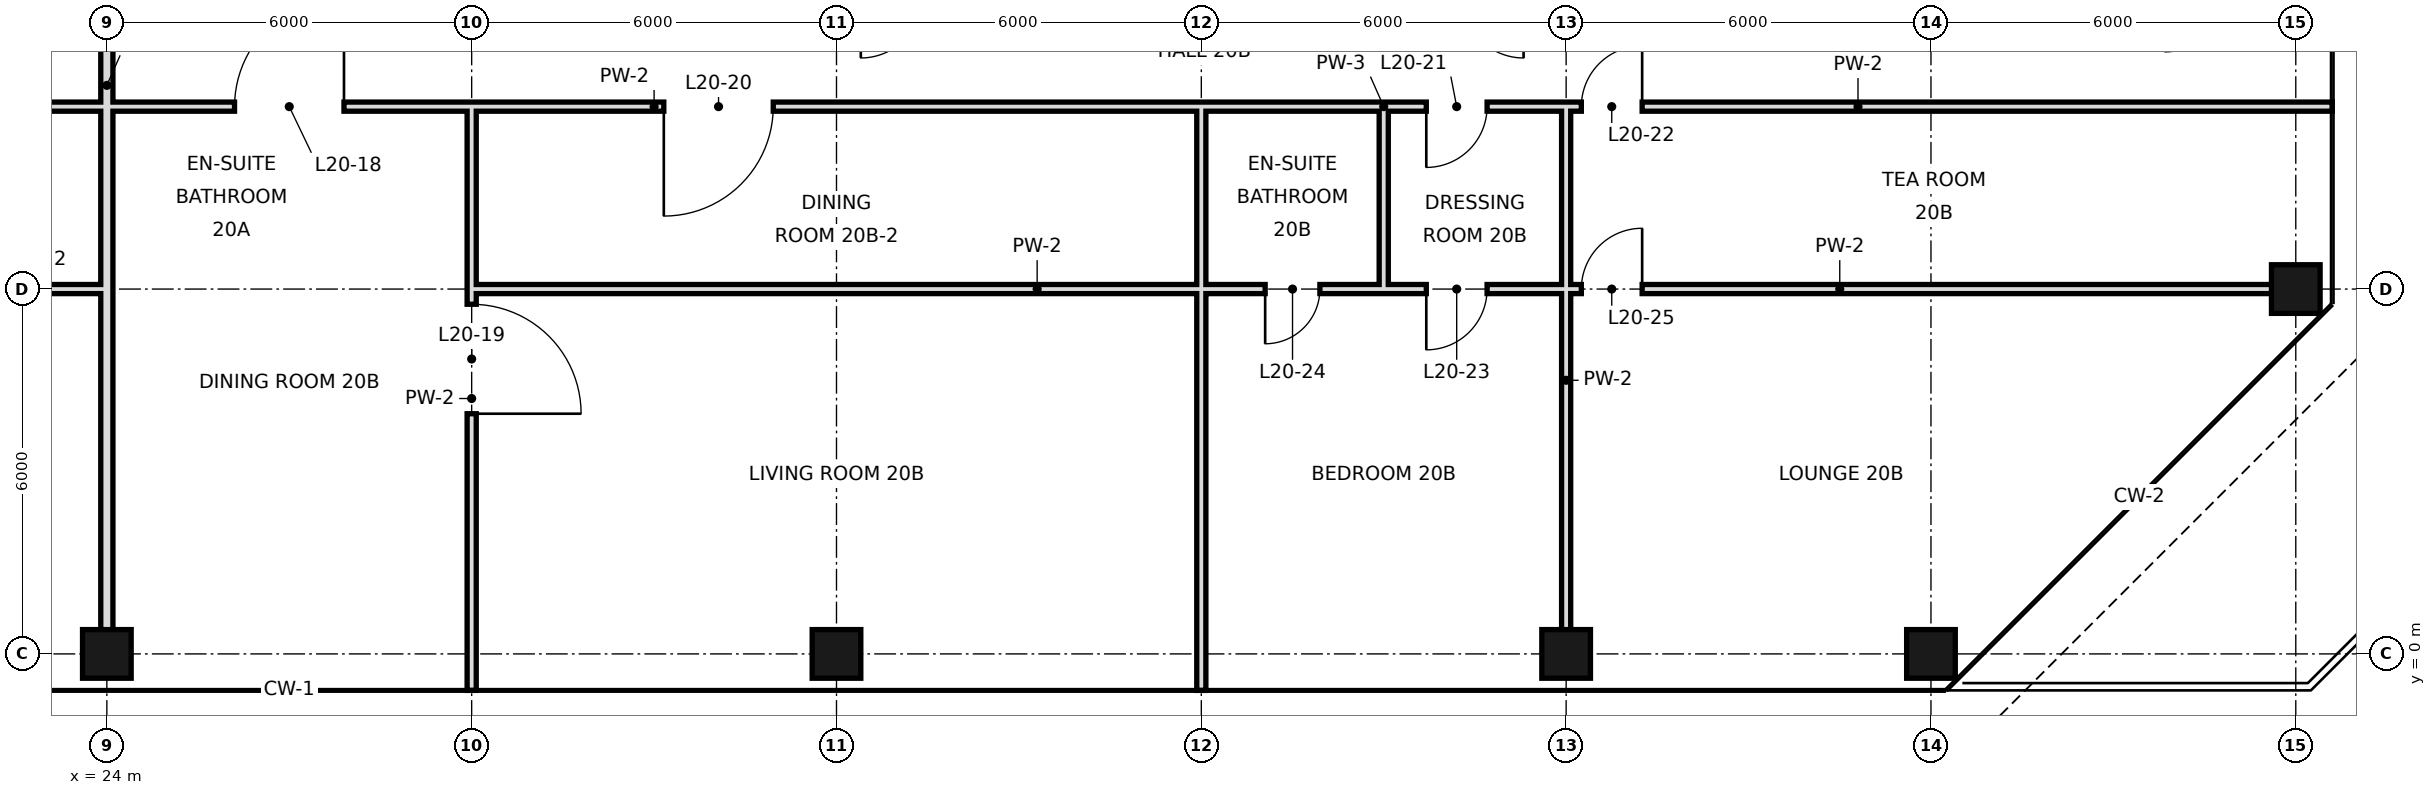
"""IFC4 building model, lengths in metres.
Left out: names, types, materials, properties, quantities, classifications, styles, units other than length and angle.
Written with IfcOpenShell. Run it as: python <this file> out.ifc"""

import sys

from ifc_helpers import new_model, si_unit, direction, frame, frame_2d, origin, origin_2d, place, context, subcontext, project, spatial, rectangle, hollow_rectangle, extrude, element, fill, save


model = new_model("IFC4")
c1 = context("Model", 3, precision=1e-05, world=origin(), true_north=direction((0.0, 1.0)))
c2 = subcontext(c1, "Body", "Model", "MODEL_VIEW")
j1 = project(units=[si_unit("LENGTHUNIT", "METRE"), si_unit("PLANEANGLEUNIT", "RADIAN")], contexts=[c1])
p1 = place(None, origin())
s1 = spatial("IfcSite", under=j1, at=p1, CompositionType="ELEMENT")
p2 = place(p1, origin())
s2 = spatial("IfcBuilding", under=s1, at=p2, CompositionType="ELEMENT")
p3 = place(p2, frame((0.0, 0.0, 96.2)))
s3 = spatial("IfcBuildingStorey", under=s2, at=p3, CompositionType="ELEMENT", Elevation=96.2)
for number, where, z_axis, x_axis in (
    (1, (24.0, 0.0, 0.0), (0.0, 0.0, 1.0), (1.0, 0.0, 0.0)),
    (2, (36.0, 0.0, 0.0), (0.0, 0.0, 1.0), (1.0, 0.0, 0.0)),
    (3, (48.0, 0.0, 0.0), (0.0, 0.0, 1.0), (1.0, 0.0, 0.0)),
):
    element("IfcColumn", number, at=place(p3, frame(where, z_axis=z_axis, x_axis=x_axis)), inside=s3, PredefinedType="COLUMN", context=c2, shape_type="SweptSolid", body=[
        extrude(hollow_rectangle(XDim=0.8, YDim=0.8, WallThickness=0.04, at=origin_2d()), origin(), (0.0, 0.0, 1.0), 3.6),
    ])
for number, where, z_axis, x_axis in (
    (4, (54.0, 0.0, -0.3), (0.0, 0.0, 1.0), (1.0, 0.0, 0.0)),
    (5, (60.0, 6.0, -0.3), (0.0, 0.0, 1.0), (1.0, 0.0, 0.0)),
):
    element("IfcColumn", number, at=place(p3, frame(where, z_axis=z_axis, x_axis=x_axis)), inside=s3, PredefinedType="COLUMN", context=c2, shape_type="SweptSolid", body=[
        extrude(hollow_rectangle(XDim=0.8, YDim=0.8, WallThickness=0.04, at=origin_2d()), origin(), (0.0, 0.0, 1.0), 3.9),
    ])
p4 = place(p3, frame((24.0, 0.0, 0.0), z_axis=(0.0, 0.0, 1.0), x_axis=(0.0, 1.0, 0.0)))
e6 = element("IfcWall", 6, at=p4, inside=s3, PredefinedType="SOLIDWALL", context=c2, shape_type="SweptSolid", body=[
    extrude(rectangle(XDim=18.7, YDim=0.2, at=frame_2d((9.35, 0.0))), origin(), (0.0, 0.0, 1.0), 2.72),
])
p5 = place(p3, frame((30.0, -0.6, 0.0), z_axis=(0.0, 0.0, 1.0), x_axis=(0.0, 1.0, 0.0)))
e7 = element("IfcWall", 7, at=p5, inside=s3, PredefinedType="PARTITIONING", context=c2, shape_type="SweptSolid", body=[
    extrude(rectangle(XDim=9.6, YDim=0.15, at=frame_2d((4.8, 0.0))), origin(), (0.0, 0.0, 1.0), 2.72),
])
p6 = place(p5, frame((4.55, 0.0, 0.0)))
e8 = element("IfcOpeningElement", 8, at=p6, cuts=e7, PredefinedType="OPENING", context=c2, shape_type="SweptSolid", body=[
    extrude(rectangle(XDim=1.8, YDim=2.4, at=frame_2d((0.9, 1.2))), frame((0.0, 0.085, 0.0), z_axis=(0.0, -1.0, 0.0), x_axis=(1.0, 0.0, 0.0)), (0.0, 0.0, 1.0), 0.17),
])
p7 = place(p3, frame((42.0, -0.6, 0.0), z_axis=(0.0, 0.0, 1.0), x_axis=(0.0, 1.0, 0.0)))
e9 = element("IfcWall", 9, at=p7, inside=s3, PredefinedType="PARTITIONING", context=c2, shape_type="SweptSolid", body=[
    extrude(rectangle(XDim=6.6, YDim=0.15, at=frame_2d((3.3, 0.0))), origin(), (0.0, 0.0, 1.0), 2.72),
])
p8 = place(p3, frame((42.0, 6.0, 0.0), z_axis=(0.0, 0.0, 1.0), x_axis=(0.0, 1.0, 0.0)))
e10 = element("IfcWall", 10, at=p8, inside=s3, PredefinedType="PARTITIONING", context=c2, shape_type="SweptSolid", body=[
    extrude(rectangle(XDim=3.0, YDim=0.15, at=frame_2d((1.5, 0.0))), origin(), (0.0, 0.0, 1.0), 2.72),
])
p9 = place(p3, frame((45.0, 6.0, 0.0), z_axis=(0.0, 0.0, 1.0), x_axis=(0.0, 1.0, 0.0)))
e11 = element("IfcWall", 11, at=p9, inside=s3, PredefinedType="PARTITIONING", context=c2, shape_type="SweptSolid", body=[
    extrude(rectangle(XDim=3.0, YDim=0.15, at=frame_2d((1.5, 0.0))), origin(), (0.0, 0.0, 1.0), 3.42),
])
p10 = place(p3, frame((48.0, 0.0, 0.0), z_axis=(0.0, 0.0, 1.0), x_axis=(0.0, 1.0, 0.0)))
e12 = element("IfcWall", 12, at=p10, inside=s3, PredefinedType="PARTITIONING", context=c2, shape_type="SweptSolid", body=[
    extrude(rectangle(XDim=9.0, YDim=0.15, at=frame_2d((4.5, 0.0))), origin(), (0.0, 0.0, 1.0), 2.72),
])
p11 = place(p3, frame((30.0, 6.0, 0.0), z_axis=(0.0, 0.0, 1.0), x_axis=(1.0, 0.0, 0.0)))
e13 = element("IfcWall", 13, at=p11, inside=s3, PredefinedType="PARTITIONING", context=c2, shape_type="SweptSolid", body=[
    extrude(rectangle(XDim=12.0, YDim=0.15, at=frame_2d((6.0, 0.0))), origin(), (0.0, 0.0, 1.0), 2.97),
])
p12 = place(p3, frame((45.0, 6.0, 0.0), z_axis=(0.0, 0.0, 1.0), x_axis=(1.0, 0.0, 0.0)))
e14 = element("IfcWall", 14, at=p12, inside=s3, PredefinedType="PARTITIONING", context=c2, shape_type="SweptSolid", body=[
    extrude(rectangle(XDim=15.0, YDim=0.15, at=frame_2d((7.5, 0.0))), origin(), (0.0, 0.0, 1.0), 2.72),
])
p13 = place(p12, frame((0.7, 0.0, 0.0)))
e15 = element("IfcOpeningElement", 15, at=p13, cuts=e14, PredefinedType="OPENING", context=c2, shape_type="SweptSolid", body=[
    extrude(rectangle(XDim=1.0, YDim=2.4, at=frame_2d((0.5, 1.2))), frame((0.0, 0.085, 0.0), z_axis=(0.0, -1.0, 0.0), x_axis=(1.0, 0.0, 0.0)), (0.0, 0.0, 1.0), 0.17),
])
p14 = place(p12, frame((3.25, 0.0, 0.0)))
e16 = element("IfcOpeningElement", 16, at=p14, cuts=e14, PredefinedType="OPENING", context=c2, shape_type="SweptSolid", body=[
    extrude(rectangle(XDim=1.0, YDim=2.4, at=frame_2d((0.5, 1.2))), frame((0.0, 0.085, 0.0), z_axis=(0.0, -1.0, 0.0), x_axis=(1.0, 0.0, 0.0)), (0.0, 0.0, 1.0), 0.17),
])
p15 = place(p3, frame((21.6, 6.0, 0.0), z_axis=(0.0, 0.0, 1.0), x_axis=(1.0, 0.0, 0.0)))
e17 = element("IfcWall", 17, at=p15, inside=s3, PredefinedType="PARTITIONING", context=c2, shape_type="SweptSolid", body=[
    extrude(rectangle(XDim=2.4, YDim=0.15, at=frame_2d((1.2, 0.0))), origin(), (0.0, 0.0, 1.0), 2.97),
])
p16 = place(p15, frame((0.25, 0.0, 0.0)))
e18 = element("IfcOpeningElement", 18, at=p16, cuts=e17, PredefinedType="OPENING", context=c2, shape_type="SweptSolid", body=[
    extrude(rectangle(XDim=0.9, YDim=2.4, at=frame_2d((0.45, 1.2))), frame((0.0, 0.085, 0.0), z_axis=(0.0, -1.0, 0.0), x_axis=(1.0, 0.0, 0.0)), (0.0, 0.0, 1.0), 0.17),
])
p17 = place(p3, frame((42.0, 6.0, 0.0), z_axis=(0.0, 0.0, 1.0), x_axis=(1.0, 0.0, 0.0)))
e19 = element("IfcWall", 19, at=p17, inside=s3, PredefinedType="PARTITIONING", context=c2, shape_type="SweptSolid", body=[
    extrude(rectangle(XDim=3.0, YDim=0.15, at=frame_2d((1.5, 0.0))), origin(), (0.0, 0.0, 1.0), 2.97),
])
p18 = place(p17, frame((1.05, 0.0, 0.0)))
e20 = element("IfcOpeningElement", 20, at=p18, cuts=e19, PredefinedType="OPENING", context=c2, shape_type="SweptSolid", body=[
    extrude(rectangle(XDim=0.9, YDim=2.4, at=frame_2d((0.45, 1.2))), frame((0.0, 0.085, 0.0), z_axis=(0.0, -1.0, 0.0), x_axis=(1.0, 0.0, 0.0)), (0.0, 0.0, 1.0), 0.17),
])
p19 = place(p3, frame((24.0, 9.0, 0.0), z_axis=(0.0, 0.0, 1.0), x_axis=(1.0, 0.0, 0.0)))
e21 = element("IfcWall", 21, at=p19, inside=s3, PredefinedType="PARTITIONING", context=c2, shape_type="SweptSolid", body=[
    extrude(rectangle(XDim=18.0, YDim=0.15, at=frame_2d((9.0, 0.0))), origin(), (0.0, 0.0, 1.0), 3.42),
])
p20 = place(p19, frame((2.1, 0.0, 0.0)))
e22 = element("IfcOpeningElement", 22, at=p20, cuts=e21, PredefinedType="OPENING", context=c2, shape_type="SweptSolid", body=[
    extrude(rectangle(XDim=1.8, YDim=2.4, at=frame_2d((0.9, 1.2))), frame((0.0, 0.085, 0.0), z_axis=(0.0, -1.0, 0.0), x_axis=(1.0, 0.0, 0.0)), (0.0, 0.0, 1.0), 0.17),
])
p21 = place(p19, frame((9.16, 0.0, 0.0)))
e23 = element("IfcOpeningElement", 23, at=p21, cuts=e21, PredefinedType="OPENING", context=c2, shape_type="SweptSolid", body=[
    extrude(rectangle(XDim=1.8, YDim=2.4, at=frame_2d((0.9, 1.2))), frame((0.0, 0.085, 0.0), z_axis=(0.0, -1.0, 0.0), x_axis=(1.0, 0.0, 0.0)), (0.0, 0.0, 1.0), 0.17),
])
p22 = place(p3, frame((45.0, 9.0, 0.0), z_axis=(0.0, 0.0, 1.0), x_axis=(1.0, 0.0, 0.0)))
e24 = element("IfcWall", 24, at=p22, inside=s3, PredefinedType="PARTITIONING", context=c2, shape_type="SweptSolid", body=[
    extrude(rectangle(XDim=15.6, YDim=0.15, at=frame_2d((7.8, 0.0))), origin(), (0.0, 0.0, 1.0), 3.42),
])
p23 = place(p22, frame((0.7, 0.0, 0.0)))
e25 = element("IfcOpeningElement", 25, at=p23, cuts=e24, PredefinedType="OPENING", context=c2, shape_type="SweptSolid", body=[
    extrude(rectangle(XDim=1.0, YDim=2.4, at=frame_2d((0.5, 1.2))), frame((0.0, 0.085, 0.0), z_axis=(0.0, -1.0, 0.0), x_axis=(1.0, 0.0, 0.0)), (0.0, 0.0, 1.0), 0.17),
])
p24 = place(p22, frame((3.25, 0.0, 0.0)))
e26 = element("IfcOpeningElement", 26, at=p24, cuts=e24, PredefinedType="OPENING", context=c2, shape_type="SweptSolid", body=[
    extrude(rectangle(XDim=1.0, YDim=2.4, at=frame_2d((0.5, 1.2))), frame((0.0, 0.085, 0.0), z_axis=(0.0, -1.0, 0.0), x_axis=(1.0, 0.0, 0.0)), (0.0, 0.0, 1.0), 0.17),
])
p25 = place(p3, frame((21.6, 9.0, 0.0), z_axis=(0.0, 0.0, 1.0), x_axis=(1.0, 0.0, 0.0)))
e27 = element("IfcWall", 27, at=p25, inside=s3, PredefinedType="PARTITIONING", context=c2, shape_type="SweptSolid", body=[
    extrude(rectangle(XDim=2.4, YDim=0.15, at=frame_2d((1.2, 0.0))), origin(), (0.0, 0.0, 1.0), 3.42),
])
p26 = place(p3, frame((42.0, 9.0, 0.0), z_axis=(0.0, 0.0, 1.0), x_axis=(1.0, 0.0, 0.0)))
e28 = element("IfcWall", 28, at=p26, inside=s3, PredefinedType="PARTITIONING", context=c2, shape_type="SweptSolid", body=[
    extrude(rectangle(XDim=3.0, YDim=0.15, at=frame_2d((1.5, 0.0))), origin(), (0.0, 0.0, 1.0), 3.42),
])
p27 = place(p20, frame((1.8, 0.0, 0.0), z_axis=(0.0, 0.0, 1.0), x_axis=(-1.0, 0.0, 0.0)))
e29 = element("IfcDoor", 29, at=p27, inside=s3, OperationType="SINGLE_SWING_LEFT", PredefinedType="DOOR", context=c2, shape_type="SweptSolid", body=[
    extrude(rectangle(XDim=1.8, YDim=2.4, at=frame_2d((0.9, 1.2))), frame((0.0, 0.025, 0.0), z_axis=(0.0, -1.0, 0.0), x_axis=(1.0, 0.0, 0.0)), (0.0, 0.0, 1.0), 0.05),
])
fill(e22, e29)
p28 = place(p6, frame((1.8, 0.0, 0.0), z_axis=(0.0, 0.0, 1.0), x_axis=(-1.0, 0.0, 0.0)))
e30 = element("IfcDoor", 30, at=p28, inside=s3, OperationType="SINGLE_SWING_RIGHT", PredefinedType="DOOR", context=c2, shape_type="SweptSolid", body=[
    extrude(rectangle(XDim=1.8, YDim=2.4, at=frame_2d((0.9, 1.2))), frame((0.0, 0.025, 0.0), z_axis=(0.0, -1.0, 0.0), x_axis=(1.0, 0.0, 0.0)), (0.0, 0.0, 1.0), 0.05),
])
fill(e8, e30)
p29 = place(p21, frame((1.8, 0.0, 0.0), z_axis=(0.0, 0.0, 1.0), x_axis=(-1.0, 0.0, 0.0)))
e31 = element("IfcDoor", 31, at=p29, inside=s3, OperationType="SINGLE_SWING_RIGHT", PredefinedType="DOOR", context=c2, shape_type="SweptSolid", body=[
    extrude(rectangle(XDim=1.8, YDim=2.4, at=frame_2d((0.9, 1.2))), frame((0.0, 0.025, 0.0), z_axis=(0.0, -1.0, 0.0), x_axis=(1.0, 0.0, 0.0)), (0.0, 0.0, 1.0), 0.05),
])
fill(e23, e31)
p30 = place(p23, frame((1.0, 0.0, 0.0), z_axis=(0.0, 0.0, 1.0), x_axis=(-1.0, 0.0, 0.0)))
e32 = element("IfcDoor", 32, at=p30, inside=s3, OperationType="SINGLE_SWING_RIGHT", PredefinedType="DOOR", context=c2, shape_type="SweptSolid", body=[
    extrude(rectangle(XDim=1.0, YDim=2.4, at=frame_2d((0.5, 1.2))), frame((0.0, 0.025, 0.0), z_axis=(0.0, -1.0, 0.0), x_axis=(1.0, 0.0, 0.0)), (0.0, 0.0, 1.0), 0.05),
])
fill(e25, e32)
p31 = place(p24, frame((1.0, 0.0, 0.0), z_axis=(0.0, 0.0, 1.0), x_axis=(-1.0, 0.0, 0.0)))
e33 = element("IfcDoor", 33, at=p31, inside=s3, OperationType="SINGLE_SWING_LEFT", PredefinedType="DOOR", context=c2, shape_type="SweptSolid", body=[
    extrude(rectangle(XDim=1.0, YDim=2.4, at=frame_2d((0.5, 1.2))), frame((0.0, 0.025, 0.0), z_axis=(0.0, -1.0, 0.0), x_axis=(1.0, 0.0, 0.0)), (0.0, 0.0, 1.0), 0.05),
])
fill(e26, e33)
p32 = place(p13, frame((1.0, 0.0, 0.0), z_axis=(0.0, 0.0, 1.0), x_axis=(-1.0, 0.0, 0.0)))
e34 = element("IfcDoor", 34, at=p32, inside=s3, OperationType="SINGLE_SWING_RIGHT", PredefinedType="DOOR", context=c2, shape_type="SweptSolid", body=[
    extrude(rectangle(XDim=1.0, YDim=2.4, at=frame_2d((0.5, 1.2))), frame((0.0, 0.025, 0.0), z_axis=(0.0, -1.0, 0.0), x_axis=(1.0, 0.0, 0.0)), (0.0, 0.0, 1.0), 0.05),
])
fill(e15, e34)
p33 = place(p18, frame((0.9, 0.0, 0.0), z_axis=(0.0, 0.0, 1.0), x_axis=(-1.0, 0.0, 0.0)))
e35 = element("IfcDoor", 35, at=p33, inside=s3, OperationType="SINGLE_SWING_RIGHT", PredefinedType="DOOR", context=c2, shape_type="SweptSolid", body=[
    extrude(rectangle(XDim=0.9, YDim=2.4, at=frame_2d((0.45, 1.2))), frame((0.0, 0.025, 0.0), z_axis=(0.0, -1.0, 0.0), x_axis=(1.0, 0.0, 0.0)), (0.0, 0.0, 1.0), 0.05),
])
fill(e20, e35)
p34 = place(p14, frame((1.0, 0.0, 0.0), z_axis=(0.0, 0.0, 1.0), x_axis=(-1.0, 0.0, 0.0)))
e36 = element("IfcDoor", 36, at=p34, inside=s3, OperationType="SINGLE_SWING_LEFT", PredefinedType="DOOR", context=c2, shape_type="SweptSolid", body=[
    extrude(rectangle(XDim=1.0, YDim=2.4, at=frame_2d((0.5, 1.2))), frame((0.0, 0.025, 0.0), z_axis=(0.0, -1.0, 0.0), x_axis=(1.0, 0.0, 0.0)), (0.0, 0.0, 1.0), 0.05),
])
fill(e16, e36)
save(model, sys.argv[1])
